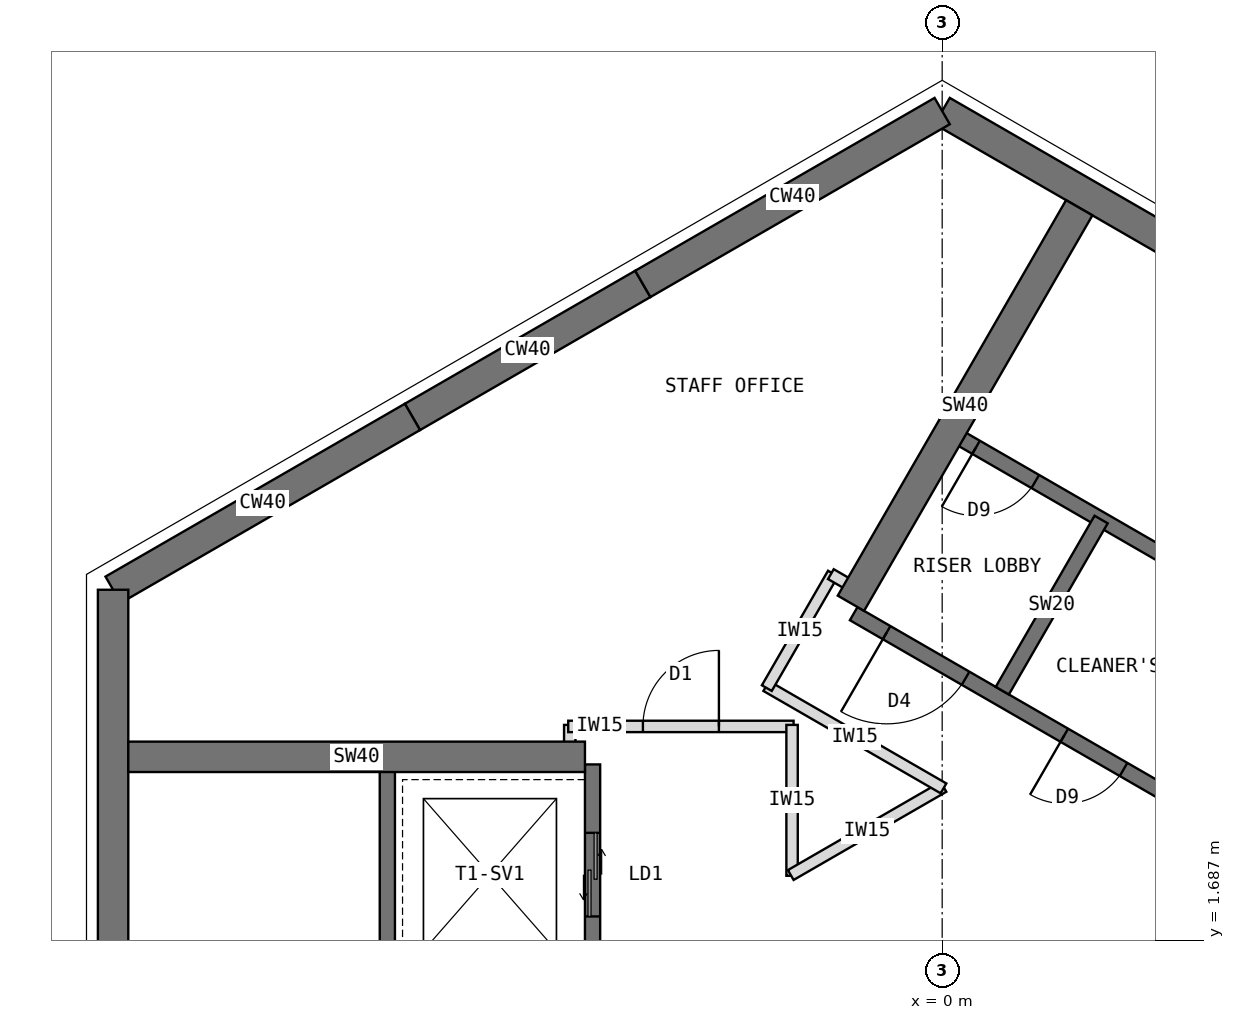
"""IFC4 building model, lengths in metres.
Left out: names, types, materials, properties, quantities, classifications, styles, units other than length and angle.
Written with IfcOpenShell. Run it as: python <this file> out.ifc"""

import sys

from ifc_helpers import new_model, si_unit, direction, frame, frame_2d, origin, place, context, subcontext, project, spatial, rectangle, extrude, element, fill, save


model = new_model("IFC4")
c1 = context("Model", 3, precision=1e-05, world=origin(), true_north=direction((0.0, 1.0)))
c2 = subcontext(c1, "Body", "Model", "MODEL_VIEW")
j1 = project(units=[si_unit("LENGTHUNIT", "METRE"), si_unit("PLANEANGLEUNIT", "RADIAN")], contexts=[c1])
p1 = place(None, origin())
s1 = spatial("IfcSite", under=j1, at=p1, CompositionType="ELEMENT")
p2 = place(p1, origin())
s2 = spatial("IfcBuilding", under=s1, at=p2, CompositionType="ELEMENT")
p3 = place(p2, frame((0.0, 0.0, 251.5)))
s3 = spatial("IfcBuildingStorey", under=s2, at=p3, CompositionType="ELEMENT", Elevation=251.5)
p4 = place(p3, frame((10.908, 6.298, 0.0), z_axis=(0.0, 0.0, 1.0), x_axis=(-0.866021940709, 0.500005998175, 0.0)))
e1 = element("IfcWall", 1, at=p4, inside=s3, PredefinedType="SHEAR", context=c2, shape_type="SweptSolid", body=[
    extrude(rectangle(XDim=12.596, YDim=0.4, at=frame_2d((6.298, 0.0))), origin(), (0.0, 0.0, 1.0), 4.0),
])
p5 = place(p3, frame((0.0, 12.596, 0.0), z_axis=(0.0, 0.0, 1.0), x_axis=(-0.866011268655, -0.500024481964, 0.0)))
e2 = element("IfcWall", 2, at=p5, inside=s3, PredefinedType="SHEAR", context=c2, shape_type="SweptSolid", body=[
    extrude(rectangle(XDim=4.548, YDim=0.4, at=frame_2d((2.274, 0.0))), origin(), (0.0, 0.0, 1.0), 4.0),
])
p6 = place(p3, frame((-3.939, 10.322, 0.0), z_axis=(0.0, 0.0, 1.0), x_axis=(-0.866019471182, -0.500010275428, 0.0)))
e3 = element("IfcWall", 3, at=p6, inside=s3, PredefinedType="SHEAR", context=c2, shape_type="SweptSolid", body=[
    extrude(rectangle(XDim=3.5, YDim=0.4, at=frame_2d((1.75, 0.0))), origin(), (0.0, 0.0, 1.0), 4.0),
])
p7 = place(p3, frame((-6.97, 8.572, 0.0), z_axis=(0.0, 0.0, 1.0), x_axis=(-0.866034513004, -0.499984222037, 0.0)))
e4 = element("IfcWall", 4, at=p7, inside=s3, PredefinedType="SHEAR", context=c2, shape_type="SweptSolid", body=[
    extrude(rectangle(XDim=4.548, YDim=0.4, at=frame_2d((2.274, 0.0))), origin(), (0.0, 0.0, 1.0), 4.0),
])
p8 = place(p3, frame((-10.908, 6.298, 0.0), z_axis=(0.0, 0.0, 1.0), x_axis=(0.0, -1.0, 0.0)))
e5 = element("IfcWall", 5, at=p8, inside=s3, PredefinedType="SHEAR", context=c2, shape_type="SweptSolid", body=[
    extrude(rectangle(XDim=12.596, YDim=0.4, at=frame_2d((6.298, 0.0))), origin(), (0.0, 0.0, 1.0), 4.0),
])
p9 = place(p3, frame((5.764, 1.984, 0.0), z_axis=(0.0, 0.0, 1.0), x_axis=(-0.866026010844, 0.49999894854, 0.0)))
e6 = element("IfcWall", 6, at=p9, inside=s3, PredefinedType="SHEAR", context=c2, shape_type="SweptSolid", body=[
    extrude(rectangle(XDim=8.0, YDim=0.2, at=frame_2d((4.0, 0.0))), origin(), (0.0, 0.0, 1.0), 4.0),
])
p10 = place(p9, frame((6.3, 0.0, 0.0)))
e7 = element("IfcOpeningElement", 7, at=p10, cuts=e6, PredefinedType="OPENING", context=c2, shape_type="SweptSolid", body=[
    extrude(rectangle(XDim=1.2, YDim=2.1, at=frame_2d((0.6, 1.05))), frame((0.0, 0.11, 0.0), z_axis=(0.0, -1.0, 0.0), x_axis=(1.0, 0.0, 0.0)), (0.0, 0.0, 1.0), 0.22),
])
p11 = place(p9, frame((1.0, 0.0, 0.0)))
e8 = element("IfcOpeningElement", 8, at=p11, cuts=e6, PredefinedType="OPENING", context=c2, shape_type="SweptSolid", body=[
    extrude(rectangle(XDim=0.9, YDim=2.1, at=frame_2d((0.45, 1.05))), frame((0.0, 0.11, 0.0), z_axis=(0.0, -1.0, 0.0), x_axis=(1.0, 0.0, 0.0)), (0.0, 0.0, 1.0), 0.22),
])
p12 = place(p9, frame((3.9, 0.0, 0.0)))
e9 = element("IfcOpeningElement", 9, at=p12, cuts=e6, PredefinedType="OPENING", context=c2, shape_type="SweptSolid", body=[
    extrude(rectangle(XDim=0.9, YDim=2.1, at=frame_2d((0.45, 1.05))), frame((0.0, 0.11, 0.0), z_axis=(0.0, -1.0, 0.0), x_axis=(1.0, 0.0, 0.0)), (0.0, 0.0, 1.0), 0.22),
])
p13 = place(p3, frame((0.791, 4.97, 0.0), z_axis=(0.0, 0.0, 1.0), x_axis=(0.499936506574, 0.866062058628, 0.0)))
e10 = element("IfcWall", 10, at=p13, inside=s3, PredefinedType="SHEAR", context=c2, shape_type="SweptSolid", body=[
    extrude(rectangle(XDim=2.6, YDim=0.2, at=frame_2d((1.3, 0.0))), origin(), (0.0, 0.0, 1.0), 4.0),
])
p14 = place(p3, frame((7.114, 4.322, 0.0), z_axis=(0.0, 0.0, 1.0), x_axis=(-0.866026010844, 0.49999894854, 0.0)))
e11 = element("IfcWall", 11, at=p14, inside=s3, PredefinedType="SHEAR", context=c2, shape_type="SweptSolid", body=[
    extrude(rectangle(XDim=8.0, YDim=0.2, at=frame_2d((4.0, 0.0))), origin(), (0.0, 0.0, 1.0), 4.0),
])
p15 = place(p14, frame((6.8, 0.0, 0.0)))
e12 = element("IfcOpeningElement", 12, at=p15, cuts=e11, PredefinedType="OPENING", context=c2, shape_type="SweptSolid", body=[
    extrude(rectangle(XDim=0.9, YDim=2.1, at=frame_2d((0.45, 1.05))), frame((0.0, 0.11, 0.0), z_axis=(0.0, -1.0, 0.0), x_axis=(1.0, 0.0, 0.0)), (0.0, 0.0, 1.0), 0.22),
])
p16 = place(p3, frame((-1.201, 6.12, 0.0), z_axis=(0.0, 0.0, 1.0), x_axis=(0.499997979876, 0.866026570101, 0.0)))
e13 = element("IfcWall", 13, at=p16, inside=s3, PredefinedType="SHEAR", context=c2, shape_type="SweptSolid", body=[
    extrude(rectangle(XDim=6.008, YDim=0.4, at=frame_2d((3.004, 0.0))), origin(), (0.0, 0.0, 1.0), 4.0),
])
p17 = place(p3, frame((-4.6, 4.0, 0.0), z_axis=(0.0, 0.0, 1.0), x_axis=(0.0, -1.0, 0.0)))
e14 = element("IfcWall", 14, at=p17, inside=s3, PredefinedType="SHEAR", context=c2, shape_type="SweptSolid", body=[
    extrude(rectangle(XDim=8.0, YDim=0.2, at=frame_2d((4.0, 0.0))), origin(), (0.0, 0.0, 1.0), 4.0),
])
p18 = place(p17, frame((6.3, 0.0, 0.0)))
e15 = element("IfcOpeningElement", 15, at=p18, cuts=e14, PredefinedType="OPENING", context=c2, shape_type="SweptSolid", body=[
    extrude(rectangle(XDim=1.2, YDim=2.1, at=frame_2d((0.6, 1.05))), frame((0.0, 0.11, 0.0), z_axis=(0.0, -1.0, 0.0), x_axis=(1.0, 0.0, 0.0)), (0.0, 0.0, 1.0), 0.22),
])
p19 = place(p17, frame((0.9, 0.0, 0.0)))
e16 = element("IfcOpeningElement", 16, at=p19, cuts=e14, PredefinedType="OPENING", context=c2, shape_type="SweptSolid", body=[
    extrude(rectangle(XDim=1.1, YDim=2.2, at=frame_2d((0.55, 1.1))), frame((0.0, 0.11, 0.0), z_axis=(0.0, -1.0, 0.0), x_axis=(1.0, 0.0, 0.0)), (0.0, 0.0, 1.0), 0.22),
])
p20 = place(p3, frame((-7.3, 4.0, 0.0), z_axis=(0.0, 0.0, 1.0), x_axis=(0.0, -1.0, 0.0)))
e17 = element("IfcWall", 17, at=p20, inside=s3, PredefinedType="SHEAR", context=c2, shape_type="SweptSolid", body=[
    extrude(rectangle(XDim=8.0, YDim=0.2, at=frame_2d((4.0, 0.0))), origin(), (0.0, 0.0, 1.0), 4.0),
])
p21 = place(p20, frame((6.7, 0.0, 0.0)))
e18 = element("IfcOpeningElement", 18, at=p21, cuts=e17, PredefinedType="OPENING", context=c2, shape_type="SweptSolid", body=[
    extrude(rectangle(XDim=1.1, YDim=2.1, at=frame_2d((0.55, 1.05))), frame((0.0, 0.11, 0.0), z_axis=(0.0, -1.0, 0.0), x_axis=(1.0, 0.0, 0.0)), (0.0, 0.0, 1.0), 0.22),
])
p22 = place(p3, frame((-4.7, 4.1, 0.0), z_axis=(0.0, 0.0, 1.0), x_axis=(-1.0, 0.0, 0.0)))
e19 = element("IfcWall", 19, at=p22, inside=s3, PredefinedType="SHEAR", context=c2, shape_type="SweptSolid", body=[
    extrude(rectangle(XDim=6.008, YDim=0.4, at=frame_2d((3.004, 0.0))), origin(), (0.0, 0.0, 1.0), 4.0),
])
p23 = place(p3, frame((-4.9, 4.09, 0.0), z_axis=(0.0, 0.0, 1.0), x_axis=(0.0, 1.0, 0.0)))
e20 = element("IfcWall", 20, at=p23, inside=s3, PredefinedType="PARTITIONING", context=c2, shape_type="SweptSolid", body=[
    extrude(rectangle(XDim=0.43, YDim=0.15, at=frame_2d((0.215, 0.0))), origin(), (0.0, 0.0, 1.0), 3.8),
])
p24 = place(p3, frame((-4.92, 4.5, 0.0), z_axis=(0.0, 0.0, 1.0), x_axis=(1.0, 0.0, 0.0)))
e21 = element("IfcWall", 21, at=p24, inside=s3, PredefinedType="PARTITIONING", context=c2, shape_type="SweptSolid", body=[
    extrude(rectangle(XDim=2.965, YDim=0.15, at=frame_2d((1.482, 0.0))), origin(), (0.0, 0.0, 1.0), 3.8),
])
p25 = place(p24, frame((0.982, 0.0, 0.0)))
e22 = element("IfcOpeningElement", 22, at=p25, cuts=e21, PredefinedType="OPENING", context=c2, shape_type="SweptSolid", body=[
    extrude(rectangle(XDim=1.0, YDim=2.1, at=frame_2d((0.5, 1.05))), frame((0.0, 0.085, 0.0), z_axis=(0.0, -1.0, 0.0), x_axis=(1.0, 0.0, 0.0)), (0.0, 0.0, 1.0), 0.17),
])
p26 = place(p3, frame((-1.975, 4.52, 0.0), z_axis=(0.0, 0.0, 1.0), x_axis=(0.0, -1.0, 0.0)))
e23 = element("IfcWall", 23, at=p26, inside=s3, PredefinedType="PARTITIONING", context=c2, shape_type="SweptSolid", body=[
    extrude(rectangle(XDim=1.985, YDim=0.15, at=frame_2d((0.993, 0.0))), origin(), (0.0, 0.0, 1.0), 3.8),
])
p27 = place(p3, frame((-1.992, 2.545, 0.0), z_axis=(0.0, 0.0, 1.0), x_axis=(0.866059450854, 0.499941024108, 0.0)))
e24 = element("IfcWall", 24, at=p27, inside=s3, PredefinedType="PARTITIONING", context=c2, shape_type="SweptSolid", body=[
    extrude(rectangle(XDim=2.321, YDim=0.15, at=frame_2d((1.16, 0.0))), origin(), (0.0, 0.0, 1.0), 3.8),
])
p28 = place(p3, frame((0.017, 3.685, 0.0), z_axis=(0.0, 0.0, 1.0), x_axis=(-0.866036099759, 0.499981473571, 0.0)))
e25 = element("IfcWall", 25, at=p28, inside=s3, PredefinedType="PARTITIONING", context=c2, shape_type="SweptSolid", body=[
    extrude(rectangle(XDim=2.692, YDim=0.15, at=frame_2d((1.346, 0.0))), origin(), (0.0, 0.0, 1.0), 3.8),
])
p29 = place(p3, frame((-2.307, 5.004, 0.0), z_axis=(0.0, 0.0, 1.0), x_axis=(0.500062521093, 0.865989304205, 0.0)))
e26 = element("IfcWall", 26, at=p29, inside=s3, PredefinedType="PARTITIONING", context=c2, shape_type="SweptSolid", body=[
    extrude(rectangle(XDim=1.74, YDim=0.15, at=frame_2d((0.87, 0.0))), origin(), (0.0, 0.0, 1.0), 3.8),
])
p30 = place(p3, frame((-1.464, 6.503, 0.0), z_axis=(0.0, 0.0, 1.0), x_axis=(0.866138304741, -0.499804398801, 0.0)))
e27 = element("IfcWall", 27, at=p30, inside=s3, PredefinedType="PARTITIONING", context=c2, shape_type="SweptSolid", body=[
    extrude(rectangle(XDim=0.43, YDim=0.15, at=frame_2d((0.215, 0.0))), origin(), (0.0, 0.0, 1.0), 3.8),
])
p31 = place(p10, origin())
e28 = element("IfcDoor", 28, at=p31, inside=s3, OperationType="SINGLE_SWING_RIGHT", PredefinedType="DOOR", context=c2, shape_type="SweptSolid", body=[
    extrude(rectangle(XDim=1.2, YDim=2.1, at=frame_2d((0.6, 1.05))), frame((0.0, 0.025, 0.0), z_axis=(0.0, -1.0, 0.0), x_axis=(1.0, 0.0, 0.0)), (0.0, 0.0, 1.0), 0.05),
])
fill(e7, e28)
p32 = place(p15, origin())
e29 = element("IfcDoor", 29, at=p32, inside=s3, OperationType="SINGLE_SWING_RIGHT", PredefinedType="DOOR", context=c2, shape_type="SweptSolid", body=[
    extrude(rectangle(XDim=0.9, YDim=2.1, at=frame_2d((0.45, 1.05))), frame((0.0, 0.025, 0.0), z_axis=(0.0, -1.0, 0.0), x_axis=(1.0, 0.0, 0.0)), (0.0, 0.0, 1.0), 0.05),
])
fill(e12, e29)
p33 = place(p19, origin())
e30 = element("IfcDoor", 30, at=p33, inside=s3, OperationType="DOUBLE_DOOR_SLIDING", PredefinedType="DOOR", context=c2, shape_type="SweptSolid", body=[
    extrude(rectangle(XDim=1.1, YDim=2.2, at=frame_2d((0.55, 1.1))), frame((0.0, 0.025, 0.0), z_axis=(0.0, -1.0, 0.0), x_axis=(1.0, 0.0, 0.0)), (0.0, 0.0, 1.0), 0.05),
])
fill(e16, e30)
p34 = place(p25, origin())
e31 = element("IfcDoor", 31, at=p34, inside=s3, OperationType="SINGLE_SWING_RIGHT", PredefinedType="DOOR", context=c2, shape_type="SweptSolid", body=[
    extrude(rectangle(XDim=1.0, YDim=2.1, at=frame_2d((0.5, 1.05))), frame((0.0, 0.025, 0.0), z_axis=(0.0, -1.0, 0.0), x_axis=(1.0, 0.0, 0.0)), (0.0, 0.0, 1.0), 0.05),
])
fill(e22, e31)
p35 = place(p12, origin())
e32 = element("IfcDoor", 32, at=p35, inside=s3, OperationType="SINGLE_SWING_RIGHT", PredefinedType="DOOR", context=c2, shape_type="SweptSolid", body=[
    extrude(rectangle(XDim=0.9, YDim=2.1, at=frame_2d((0.45, 1.05))), frame((0.0, 0.025, 0.0), z_axis=(0.0, -1.0, 0.0), x_axis=(1.0, 0.0, 0.0)), (0.0, 0.0, 1.0), 0.05),
])
fill(e9, e32)
save(model, sys.argv[1])
